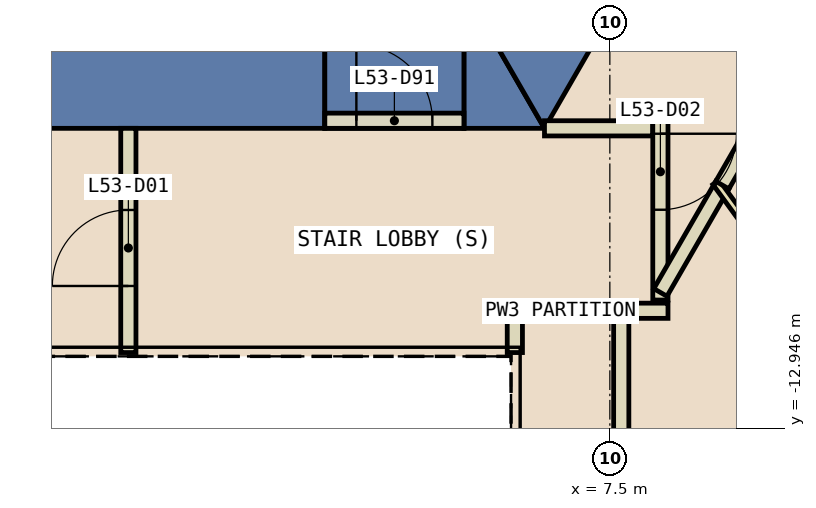
"""IFC4 building model, lengths in metres.
Left out: names, types, materials, properties, quantities, classifications, styles, units other than length and angle.
Written with IfcOpenShell. Run it as: python <this file> out.ifc"""

import sys

from ifc_helpers import new_model, si_unit, direction, frame, frame_2d, origin, place, context, subcontext, project, spatial, polyline, rectangle, outline, extrude, element, fill, save


model = new_model("IFC4")
c1 = context("Model", 3, precision=1e-05, world=origin(), true_north=direction((0.0, 1.0)))
c2 = subcontext(c1, "Body", "Model", "MODEL_VIEW")
j1 = project(units=[si_unit("LENGTHUNIT", "METRE"), si_unit("PLANEANGLEUNIT", "RADIAN")], contexts=[c1])
p1 = place(None, origin())
s1 = spatial("IfcSite", under=j1, at=p1, CompositionType="ELEMENT")
p2 = place(p1, origin())
s2 = spatial("IfcBuilding", under=s1, at=p2, CompositionType="ELEMENT")
p3 = place(p2, frame((0.0, 0.0, 236.0)))
s3 = spatial("IfcBuildingStorey", under=s2, at=p3, CompositionType="ELEMENT", Elevation=236.0)
p4 = place(p3, frame((0.0, 0.0, -0.6)))
e1 = element("IfcWall", 1, at=p4, inside=s3, PredefinedType="SHEAR", context=c2, shape_type="SweptSolid", body=[
    extrude(outline(polyline([(3.75, -9.0), (3.75, -6.9), (-5.427, -6.9), (-6.64, -9.0), (3.75, -9.0)])), origin(), (0.0, 0.0, 1.0), 5.4),
])
p5 = place(p3, frame((0.0, 0.0, -0.6)))
e2 = element("IfcWall", 2, at=p5, inside=s3, PredefinedType="SHEAR", context=c2, shape_type="SweptSolid", body=[
    extrude(outline(polyline([(5.58, -7.165), (5.58, -9.0), (6.64, -9.0), (5.58, -7.165)])), origin(), (0.0, 0.0, 1.0), 5.4),
])
p6 = place(p3, frame((0.0, 0.0, 3.6)))
e3 = element("IfcWall", 3, at=p6, inside=s3, PredefinedType="SHEAR", context=c2, shape_type="SweptSolid", body=[
    extrude(outline(polyline([(5.58, -9.0), (5.58, -7.165), (5.427, -6.9), (3.75, -6.9), (3.75, -9.0), (5.58, -9.0)])), origin(), (0.0, 0.0, 1.0), 1.2),
])
p7 = place(p3, frame((0.0, 0.0, -0.6)))
e4 = element("IfcWall", 4, at=p7, inside=s3, PredefinedType="SHEAR", context=c2, shape_type="SweptSolid", body=[
    extrude(outline(polyline([(6.64, -9.0), (13.279, 2.5), (10.854, 2.5), (5.427, -6.9), (6.64, -9.0)])), origin(), (0.0, 0.0, 1.0), 5.4),
])
p8 = place(p3, frame((8.877, -5.125, 0.0), z_axis=(0.0, 0.0, 1.0), x_axis=(0.866032640494, -0.499987465442, 0.0)))
e5 = element("IfcWall", 5, at=p8, inside=s3, PredefinedType="SHEAR", context=c2, shape_type="SweptSolid", body=[
    extrude(rectangle(XDim=23.232, YDim=1.0, at=frame_2d((11.616, 0.0))), origin(), (0.0, 0.0, 1.0), 4.8),
])
p9 = place(p3, frame((1.165, -11.95, 0.0), z_axis=(0.0, 0.0, 1.0), x_axis=(0.0, 1.0, 0.0)))
e6 = element("IfcWall", 6, at=p9, inside=s3, PredefinedType="PARTITIONING", context=c2, shape_type="SweptSolid", body=[
    extrude(rectangle(XDim=2.95, YDim=0.2, at=frame_2d((1.475, 0.0))), origin(), (0.0, 0.0, 1.0), 4.8),
])
p10 = place(p9, frame((0.876, 0.0, 0.0)))
e7 = element("IfcOpeningElement", 7, at=p10, cuts=e6, PredefinedType="OPENING", context=c2, shape_type="SweptSolid", body=[
    extrude(rectangle(XDim=1.0, YDim=2.1, at=frame_2d((0.5, 1.05))), frame((0.0, 0.11, 0.0), z_axis=(0.0, -1.0, 0.0), x_axis=(1.0, 0.0, 0.0)), (0.0, 0.0, 1.0), 0.22),
])
p11 = place(p3, frame((7.55, -11.4, 0.0), z_axis=(0.0, 0.0, 1.0), x_axis=(-1.0, 0.0, 0.0)))
e8 = element("IfcWall", 8, at=p11, inside=s3, PredefinedType="PARTITIONING", context=c2, shape_type="SweptSolid", body=[
    extrude(rectangle(XDim=1.399, YDim=0.2, at=frame_2d((0.7, 0.0))), origin(), (0.0, 0.0, 1.0), 4.8),
])
p12 = place(p3, frame((6.25, -11.5, 0.0), z_axis=(0.0, 0.0, 1.0), x_axis=(0.0, -1.0, 0.0)))
e9 = element("IfcWall", 9, at=p12, inside=s3, PredefinedType="PARTITIONING", context=c2, shape_type="SweptSolid", body=[
    extrude(rectangle(XDim=0.45, YDim=0.2, at=frame_2d((0.225, 0.0))), origin(), (0.0, 0.0, 1.0), 4.8),
])
p13 = place(p3, frame((6.64, -9.0, 0.0), z_axis=(0.0, 0.0, 1.0), x_axis=(1.0, 0.0, 0.0)))
e10 = element("IfcWall", 10, at=p13, inside=s3, PredefinedType="PARTITIONING", context=c2, shape_type="SweptSolid", body=[
    extrude(rectangle(XDim=1.425, YDim=0.2, at=frame_2d((0.712, 0.0))), origin(), (0.0, 0.0, 1.0), 4.8),
])
p14 = place(p3, frame((8.165, -8.9, 0.0), z_axis=(0.0, 0.0, 1.0), x_axis=(0.0, -1.0, 0.0)))
e11 = element("IfcWall", 11, at=p14, inside=s3, PredefinedType="PARTITIONING", context=c2, shape_type="SweptSolid", body=[
    extrude(rectangle(XDim=2.359, YDim=0.2, at=frame_2d((1.18, 0.0))), origin(), (0.0, 0.0, 1.0), 4.8),
])
p15 = place(p14, frame((0.171, 0.0, 0.0)))
e12 = element("IfcOpeningElement", 12, at=p15, cuts=e11, PredefinedType="OPENING", context=c2, shape_type="SweptSolid", body=[
    extrude(rectangle(XDim=1.0, YDim=2.1, at=frame_2d((0.5, 1.05))), frame((0.0, 0.11, 0.0), z_axis=(0.0, -1.0, 0.0), x_axis=(1.0, 0.0, 0.0)), (0.0, 0.0, 1.0), 0.22),
])
p16 = place(p3, frame((8.265, -11.4, 0.0), z_axis=(0.0, 0.0, 1.0), x_axis=(-1.0, 0.0, 0.0)))
e13 = element("IfcWall", 13, at=p16, inside=s3, PredefinedType="PARTITIONING", context=c2, shape_type="SweptSolid", body=[
    extrude(rectangle(XDim=0.515, YDim=0.2, at=frame_2d((0.257, 0.0))), origin(), (0.0, 0.0, 1.0), 4.8),
])
p17 = place(p3, frame((7.65, -11.3, 0.0), z_axis=(0.0, 0.0, 1.0), x_axis=(0.0, -1.0, 0.0)))
e14 = element("IfcWall", 14, at=p17, inside=s3, PredefinedType="PARTITIONING", context=c2, shape_type="SweptSolid", body=[
    extrude(rectangle(XDim=5.465, YDim=0.2, at=frame_2d((2.732, 0.0))), origin(), (0.0, 0.0, 1.0), 4.8),
])
p18 = place(p3, frame((8.98, -9.747, 0.0), z_axis=(0.0, 0.0, 1.0), x_axis=(-0.499908274205, -0.866078355221, 0.0)))
e15 = element("IfcWall", 15, at=p18, inside=s3, PredefinedType="PARTITIONING", context=c2, shape_type="SweptSolid", body=[
    extrude(rectangle(XDim=1.63, YDim=0.2, at=frame_2d((0.815, 0.0))), origin(), (0.0, 0.0, 1.0), 4.8),
])
p19 = place(p3, frame((8.896, -9.709, 0.0), z_axis=(0.0, 0.0, 1.0), x_axis=(0.588922600502, -0.808189439808, 0.0)))
e16 = element("IfcWall", 16, at=p19, inside=s3, PredefinedType="PARTITIONING", context=c2, shape_type="SweptSolid", body=[
    extrude(rectangle(XDim=16.369, YDim=0.1, at=frame_2d((8.184, 0.0))), origin(), (0.0, 0.0, 1.0), 4.8),
])
p20 = place(p3, frame((3.75, -8.9, 0.0), z_axis=(0.0, 0.0, 1.0), x_axis=(1.0, 0.0, 0.0)))
e17 = element("IfcWall", 17, at=p20, inside=s3, PredefinedType="PARTITIONING", context=c2, shape_type="SweptSolid", body=[
    extrude(rectangle(XDim=1.83, YDim=0.2, at=frame_2d((0.915, 0.0))), origin(), (0.0, 0.0, 1.0), 2.4),
])
p21 = place(p20, frame((0.415, 0.0, 0.0)))
e18 = element("IfcOpeningElement", 18, at=p21, cuts=e17, PredefinedType="OPENING", context=c2, shape_type="SweptSolid", body=[
    extrude(rectangle(XDim=1.0, YDim=2.1, at=frame_2d((0.5, 1.05))), frame((0.0, 0.11, 0.0), z_axis=(0.0, -1.0, 0.0), x_axis=(1.0, 0.0, 0.0)), (0.0, 0.0, 1.0), 0.22),
])
p22 = place(p3, frame((9.492, -8.859, 0.0), z_axis=(0.0, 0.0, 1.0), x_axis=(-0.499392554388, -0.866375828738, 0.0)))
e19 = element("IfcWall", 19, at=p22, inside=s3, PredefinedType="PARTITIONING", context=c2, shape_type="SweptSolid", body=[
    extrude(rectangle(XDim=1.025, YDim=0.2, at=frame_2d((0.513, 0.0))), origin(), (0.0, 0.0, 1.0), 2.4),
])
p23 = place(p10, origin())
e20 = element("IfcDoor", 20, at=p23, inside=s3, OperationType="SINGLE_SWING_LEFT", PredefinedType="DOOR", context=c2, shape_type="SweptSolid", body=[
    extrude(rectangle(XDim=1.0, YDim=2.1, at=frame_2d((0.5, 1.05))), frame((0.0, 0.025, 0.0), z_axis=(0.0, -1.0, 0.0), x_axis=(1.0, 0.0, 0.0)), (0.0, 0.0, 1.0), 0.05),
])
fill(e7, e20)
p24 = place(p15, origin())
e21 = element("IfcDoor", 21, at=p24, inside=s3, OperationType="SINGLE_SWING_RIGHT", PredefinedType="DOOR", context=c2, shape_type="SweptSolid", body=[
    extrude(rectangle(XDim=1.0, YDim=2.1, at=frame_2d((0.5, 1.05))), frame((0.0, 0.025, 0.0), z_axis=(0.0, -1.0, 0.0), x_axis=(1.0, 0.0, 0.0)), (0.0, 0.0, 1.0), 0.05),
])
fill(e12, e21)
p25 = place(p21, origin())
e22 = element("IfcDoor", 22, at=p25, inside=s3, OperationType="SINGLE_SWING_LEFT", PredefinedType="DOOR", context=c2, shape_type="SweptSolid", body=[
    extrude(rectangle(XDim=1.0, YDim=2.1, at=frame_2d((0.5, 1.05))), frame((0.0, 0.025, 0.0), z_axis=(0.0, -1.0, 0.0), x_axis=(1.0, 0.0, 0.0)), (0.0, 0.0, 1.0), 0.05),
])
fill(e18, e22)
save(model, sys.argv[1])
